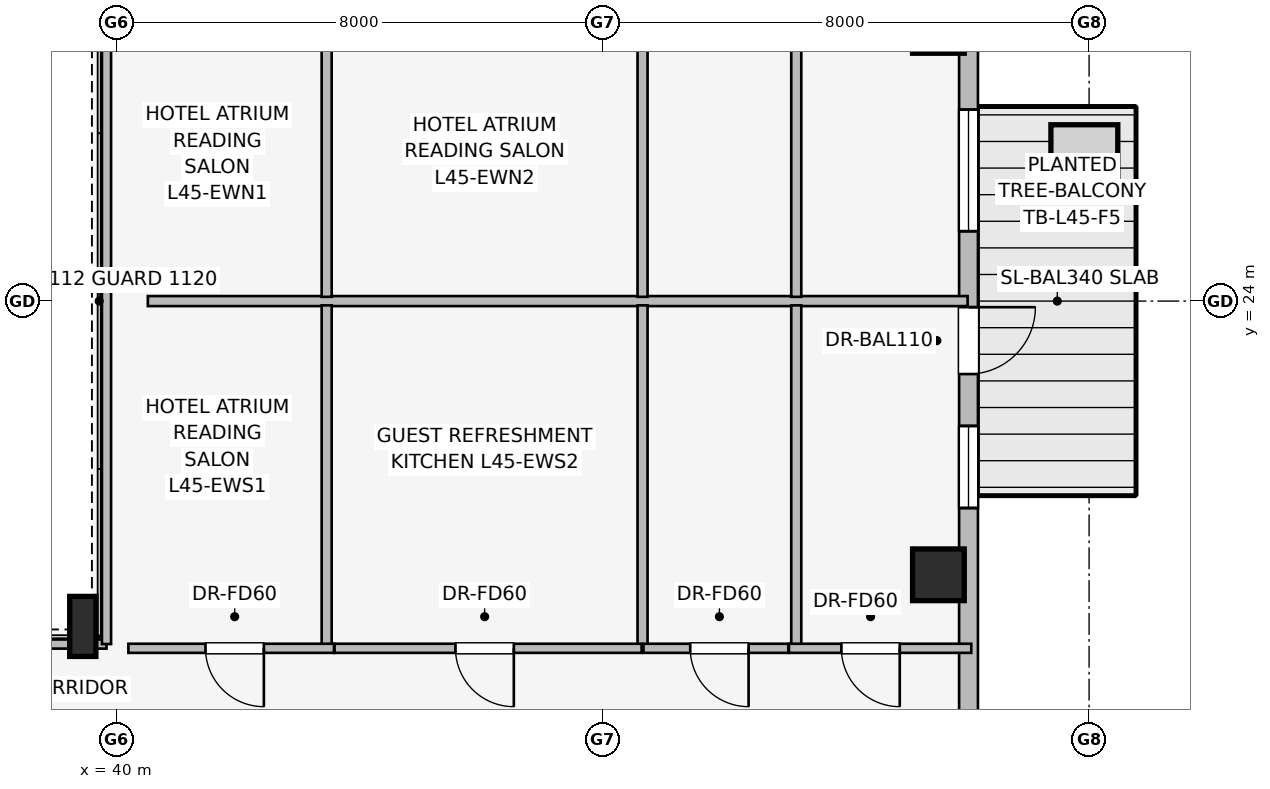
"""IFC4 building model, lengths in metres.
Left out: names, types, materials, properties, quantities, classifications, styles, units other than length and angle.
Written with IfcOpenShell. Run it as: python <this file> out.ifc"""

import sys

from ifc_helpers import new_model, si_unit, direction, frame, frame_2d, origin, origin_2d, place, context, subcontext, project, spatial, rectangle, i_section, extrude, element, fill, save


model = new_model("IFC4")
c1 = context("Model", 3, precision=1e-05, world=origin(), true_north=direction((0.0, 1.0)))
c2 = subcontext(c1, "Body", "Model", "MODEL_VIEW")
j1 = project(units=[si_unit("LENGTHUNIT", "METRE"), si_unit("PLANEANGLEUNIT", "RADIAN")], contexts=[c1])
p1 = place(None, origin())
s1 = spatial("IfcSite", under=j1, at=p1, CompositionType="ELEMENT")
p2 = place(p1, origin())
s2 = spatial("IfcBuilding", under=s1, at=p2, CompositionType="ELEMENT")
p3 = place(p2, frame((0.0, 0.0, 167.1)))
s3 = spatial("IfcBuildingStorey", under=s2, at=p3, CompositionType="ELEMENT", Elevation=167.1)
for number, where, z_axis, x_axis in (
    (1, (53.522, 19.499, 0.0), (0.0, 0.0, 1.0), (1.0, 0.0, 0.0)),
    (2, (53.522, 28.501, 0.0), (0.0, 0.0, 1.0), (1.0, 0.0, 0.0)),
):
    element("IfcColumn", number, at=place(p3, frame(where, z_axis=z_axis, x_axis=x_axis)), inside=s3, PredefinedType="COLUMN", context=c2, shape_type="SweptSolid", body=[
        extrude(rectangle(XDim=0.85, YDim=0.85, at=origin_2d()), origin(), (0.0, 0.0, 1.0), 3.45),
    ])
p4 = place(p3, frame((39.45, 18.65, 0.0), z_axis=(0.0, 0.0, 1.0), x_axis=(1.0, 0.0, 0.0)))
e3 = element("IfcColumn", 3, at=p4, inside=s3, PredefinedType="COLUMN", context=c2, shape_type="SweptSolid", body=[
    extrude(i_section(OverallWidth=0.431, OverallDepth=0.987, WebThickness=0.034, FlangeThickness=0.062, at=origin_2d()), origin(), (0.0, 0.0, 1.0), 3.45),
])
p5 = place(p3, frame((54.017, 31.502, 0.0), z_axis=(0.0, 0.0, 1.0), x_axis=(0.0, -1.0, 0.0)))
e4 = element("IfcWall", 4, at=p5, inside=s3, PredefinedType="STANDARD", context=c2, shape_type="SweptSolid", body=[
    extrude(rectangle(XDim=15.004, YDim=0.31, at=frame_2d((7.502, 0.0))), origin(), (0.0, 0.0, 1.0), 3.19),
])
p6 = place(p5, frame((7.602, 0.0, 0.0)))
e5 = element("IfcOpeningElement", 5, at=p6, cuts=e4, PredefinedType="OPENING", context=c2, shape_type="SweptSolid", body=[
    extrude(rectangle(XDim=1.1, YDim=2.04, at=frame_2d((0.55, 1.02))), frame((0.0, 0.165, 0.0), z_axis=(0.0, -1.0, 0.0), x_axis=(1.0, 0.0, 0.0)), (0.0, 0.0, 1.0), 0.33),
])
p7 = place(p5, frame((4.353, 0.0, 0.75)))
e6 = element("IfcOpeningElement", 6, at=p7, cuts=e4, PredefinedType="OPENING", context=c2, shape_type="SweptSolid", body=[
    extrude(rectangle(XDim=2.0, YDim=1.5, at=frame_2d((1.0, 0.75))), frame((0.0, 0.165, 0.0), z_axis=(0.0, -1.0, 0.0), x_axis=(1.0, 0.0, 0.0)), (0.0, 0.0, 1.0), 0.33),
])
p8 = place(p5, frame((9.555, 0.0, 0.75)))
e7 = element("IfcOpeningElement", 7, at=p8, cuts=e4, PredefinedType="OPENING", context=c2, shape_type="SweptSolid", body=[
    extrude(rectangle(XDim=1.35, YDim=1.45, at=frame_2d((0.675, 0.725))), frame((0.0, 0.165, 0.0), z_axis=(0.0, -1.0, 0.0), x_axis=(1.0, 0.0, 0.0)), (0.0, 0.0, 1.0), 0.33),
])
p9 = place(p3, frame((27.675, 18.36, 0.0), z_axis=(0.0, 0.0, 1.0), x_axis=(1.0, 0.0, 0.0)))
e8 = element("IfcWall", 8, at=p9, inside=s3, PredefinedType="PARTITIONING", context=c2, shape_type="SweptSolid", body=[
    extrude(rectangle(XDim=12.165, YDim=0.15, at=frame_2d((6.083, 0.0))), origin(), (0.0, 0.0, 1.0), 2.331),
])
p10 = place(p3, frame((39.84, 18.36, 0.0), z_axis=(0.0, 0.0, 1.0), x_axis=(0.0, 1.0, 0.0)))
e9 = element("IfcWall", 9, at=p10, inside=s3, PredefinedType="PARTITIONING", context=c2, shape_type="SweptSolid", body=[
    extrude(rectangle(XDim=11.28, YDim=0.15, at=frame_2d((5.64, 0.0))), origin(), (0.0, 0.0, 1.0), 3.19),
])
p11 = place(p3, frame((40.52, 24.0, 0.0), z_axis=(0.0, 0.0, 1.0), x_axis=(1.0, 0.0, 0.0)))
e10 = element("IfcWall", 10, at=p11, inside=s3, PredefinedType="PARTITIONING", context=c2, shape_type="SweptSolid", body=[
    extrude(rectangle(XDim=13.482, YDim=0.165, at=frame_2d((6.741, 0.0))), origin(), (0.0, 0.0, 1.0), 3.19),
])
for number, where, z_axis, x_axis in (
    (11, (43.461, 24.07, 0.0), (0.0, 0.0, 1.0), (0.0, 1.0, 0.0)),
    (12, (48.656, 24.07, 0.0), (0.0, 0.0, 1.0), (0.0, 1.0, 0.0)),
    (13, (51.184, 24.07, 0.0), (0.0, 0.0, 1.0), (0.0, 1.0, 0.0)),
    (14, (43.461, 18.29, 0.0), (0.0, 0.0, 1.0), (0.0, 1.0, 0.0)),
    (15, (48.656, 18.29, 0.0), (0.0, 0.0, 1.0), (0.0, 1.0, 0.0)),
    (16, (51.184, 18.29, 0.0), (0.0, 0.0, 1.0), (0.0, 1.0, 0.0)),
):
    element("IfcWall", number, at=place(p3, frame(where, z_axis=z_axis, x_axis=x_axis)), inside=s3, PredefinedType="PARTITIONING", context=c2, shape_type="SweptSolid", body=[
        extrude(rectangle(XDim=5.64, YDim=0.165, at=frame_2d((2.82, 0.0))), origin(), (0.0, 0.0, 1.0), 3.19),
    ])
p12 = place(p3, frame((43.581, 18.29, 0.0), z_axis=(0.0, 0.0, 1.0), x_axis=(-1.0, 0.0, 0.0)))
e17 = element("IfcWall", 17, at=p12, inside=s3, PredefinedType="PARTITIONING", context=c2, shape_type="SweptSolid", body=[
    extrude(rectangle(XDim=3.381, YDim=0.15, at=frame_2d((1.69, 0.0))), origin(), (0.0, 0.0, 1.0), 3.19),
])
p13 = place(p12, frame((1.153, 0.0, 0.0)))
e18 = element("IfcOpeningElement", 18, at=p13, cuts=e17, PredefinedType="OPENING", context=c2, shape_type="SweptSolid", body=[
    extrude(rectangle(XDim=0.96, YDim=2.0, at=frame_2d((0.48, 1.0))), frame((0.0, 0.085, 0.0), z_axis=(0.0, -1.0, 0.0), x_axis=(1.0, 0.0, 0.0)), (0.0, 0.0, 1.0), 0.17),
])
p14 = place(p3, frame((48.641, 18.29, 0.0), z_axis=(0.0, 0.0, 1.0), x_axis=(-1.0, 0.0, 0.0)))
e19 = element("IfcWall", 19, at=p14, inside=s3, PredefinedType="PARTITIONING", context=c2, shape_type="SweptSolid", body=[
    extrude(rectangle(XDim=5.05, YDim=0.15, at=frame_2d((2.525, 0.0))), origin(), (0.0, 0.0, 1.0), 3.19),
])
p15 = place(p14, frame((2.102, 0.0, 0.0)))
e20 = element("IfcOpeningElement", 20, at=p15, cuts=e19, PredefinedType="OPENING", context=c2, shape_type="SweptSolid", body=[
    extrude(rectangle(XDim=0.96, YDim=2.0, at=frame_2d((0.48, 1.0))), frame((0.0, 0.085, 0.0), z_axis=(0.0, -1.0, 0.0), x_axis=(1.0, 0.0, 0.0)), (0.0, 0.0, 1.0), 0.17),
])
p16 = place(p3, frame((51.054, 18.29, 0.0), z_axis=(0.0, 0.0, 1.0), x_axis=(-1.0, 0.0, 0.0)))
e21 = element("IfcWall", 21, at=p16, inside=s3, PredefinedType="PARTITIONING", context=c2, shape_type="SweptSolid", body=[
    extrude(rectangle(XDim=2.383, YDim=0.15, at=frame_2d((1.191, 0.0))), origin(), (0.0, 0.0, 1.0), 3.19),
])
p17 = place(p16, frame((0.654, 0.0, 0.0)))
e22 = element("IfcOpeningElement", 22, at=p17, cuts=e21, PredefinedType="OPENING", context=c2, shape_type="SweptSolid", body=[
    extrude(rectangle(XDim=0.96, YDim=2.0, at=frame_2d((0.48, 1.0))), frame((0.0, 0.085, 0.0), z_axis=(0.0, -1.0, 0.0), x_axis=(1.0, 0.0, 0.0)), (0.0, 0.0, 1.0), 0.17),
])
p18 = place(p3, frame((54.062, 18.29, 0.0), z_axis=(0.0, 0.0, 1.0), x_axis=(-1.0, 0.0, 0.0)))
e23 = element("IfcWall", 23, at=p18, inside=s3, PredefinedType="PARTITIONING", context=c2, shape_type="SweptSolid", body=[
    extrude(rectangle(XDim=2.998, YDim=0.15, at=frame_2d((1.499, 0.0))), origin(), (0.0, 0.0, 1.0), 3.19),
])
p19 = place(p18, frame((1.176, 0.0, 0.0)))
e24 = element("IfcOpeningElement", 24, at=p19, cuts=e23, PredefinedType="OPENING", context=c2, shape_type="SweptSolid", body=[
    extrude(rectangle(XDim=0.96, YDim=2.0, at=frame_2d((0.48, 1.0))), frame((0.0, 0.085, 0.0), z_axis=(0.0, -1.0, 0.0), x_axis=(1.0, 0.0, 0.0)), (0.0, 0.0, 1.0), 0.17),
])
p20 = place(p6, origin())
e25 = element("IfcDoor", 25, at=p20, inside=s3, OperationType="SINGLE_SWING_LEFT", PredefinedType="DOOR", context=c2, shape_type="SweptSolid", body=[
    extrude(rectangle(XDim=1.1, YDim=2.04, at=frame_2d((0.55, 1.02))), frame((0.0, 0.025, 0.0), z_axis=(0.0, -1.0, 0.0), x_axis=(1.0, 0.0, 0.0)), (0.0, 0.0, 1.0), 0.05),
])
fill(e5, e25)
p21 = place(p7, origin())
e26 = element("IfcWindow", 26, at=p21, inside=s3, PartitioningType="SINGLE_PANEL", PredefinedType="WINDOW", context=c2, shape_type="SweptSolid", body=[
    extrude(rectangle(XDim=2.0, YDim=1.5, at=frame_2d((1.0, 0.75))), frame((0.0, 0.03, 0.0), z_axis=(0.0, -1.0, 0.0), x_axis=(1.0, 0.0, 0.0)), (0.0, 0.0, 1.0), 0.06),
])
fill(e6, e26)
p22 = place(p8, origin())
e27 = element("IfcWindow", 27, at=p22, inside=s3, PartitioningType="SINGLE_PANEL", PredefinedType="WINDOW", context=c2, shape_type="SweptSolid", body=[
    extrude(rectangle(XDim=1.35, YDim=1.45, at=frame_2d((0.675, 0.725))), frame((0.0, 0.03, 0.0), z_axis=(0.0, -1.0, 0.0), x_axis=(1.0, 0.0, 0.0)), (0.0, 0.0, 1.0), 0.06),
])
fill(e7, e27)
p23 = place(p13, origin())
e28 = element("IfcDoor", 28, at=p23, inside=s3, OperationType="SINGLE_SWING_LEFT", PredefinedType="DOOR", context=c2, shape_type="SweptSolid", body=[
    extrude(rectangle(XDim=0.96, YDim=2.0, at=frame_2d((0.48, 1.0))), frame((0.0, 0.025, 0.0), z_axis=(0.0, -1.0, 0.0), x_axis=(1.0, 0.0, 0.0)), (0.0, 0.0, 1.0), 0.05),
])
fill(e18, e28)
p24 = place(p15, origin())
e29 = element("IfcDoor", 29, at=p24, inside=s3, OperationType="SINGLE_SWING_LEFT", PredefinedType="DOOR", context=c2, shape_type="SweptSolid", body=[
    extrude(rectangle(XDim=0.96, YDim=2.0, at=frame_2d((0.48, 1.0))), frame((0.0, 0.025, 0.0), z_axis=(0.0, -1.0, 0.0), x_axis=(1.0, 0.0, 0.0)), (0.0, 0.0, 1.0), 0.05),
])
fill(e20, e29)
p25 = place(p17, origin())
e30 = element("IfcDoor", 30, at=p25, inside=s3, OperationType="SINGLE_SWING_LEFT", PredefinedType="DOOR", context=c2, shape_type="SweptSolid", body=[
    extrude(rectangle(XDim=0.96, YDim=2.0, at=frame_2d((0.48, 1.0))), frame((0.0, 0.025, 0.0), z_axis=(0.0, -1.0, 0.0), x_axis=(1.0, 0.0, 0.0)), (0.0, 0.0, 1.0), 0.05),
])
fill(e22, e30)
p26 = place(p19, origin())
e31 = element("IfcDoor", 31, at=p26, inside=s3, OperationType="SINGLE_SWING_LEFT", PredefinedType="DOOR", context=c2, shape_type="SweptSolid", body=[
    extrude(rectangle(XDim=0.96, YDim=2.0, at=frame_2d((0.48, 1.0))), frame((0.0, 0.025, 0.0), z_axis=(0.0, -1.0, 0.0), x_axis=(1.0, 0.0, 0.0)), (0.0, 0.0, 1.0), 0.05),
])
fill(e24, e31)
save(model, sys.argv[1])
